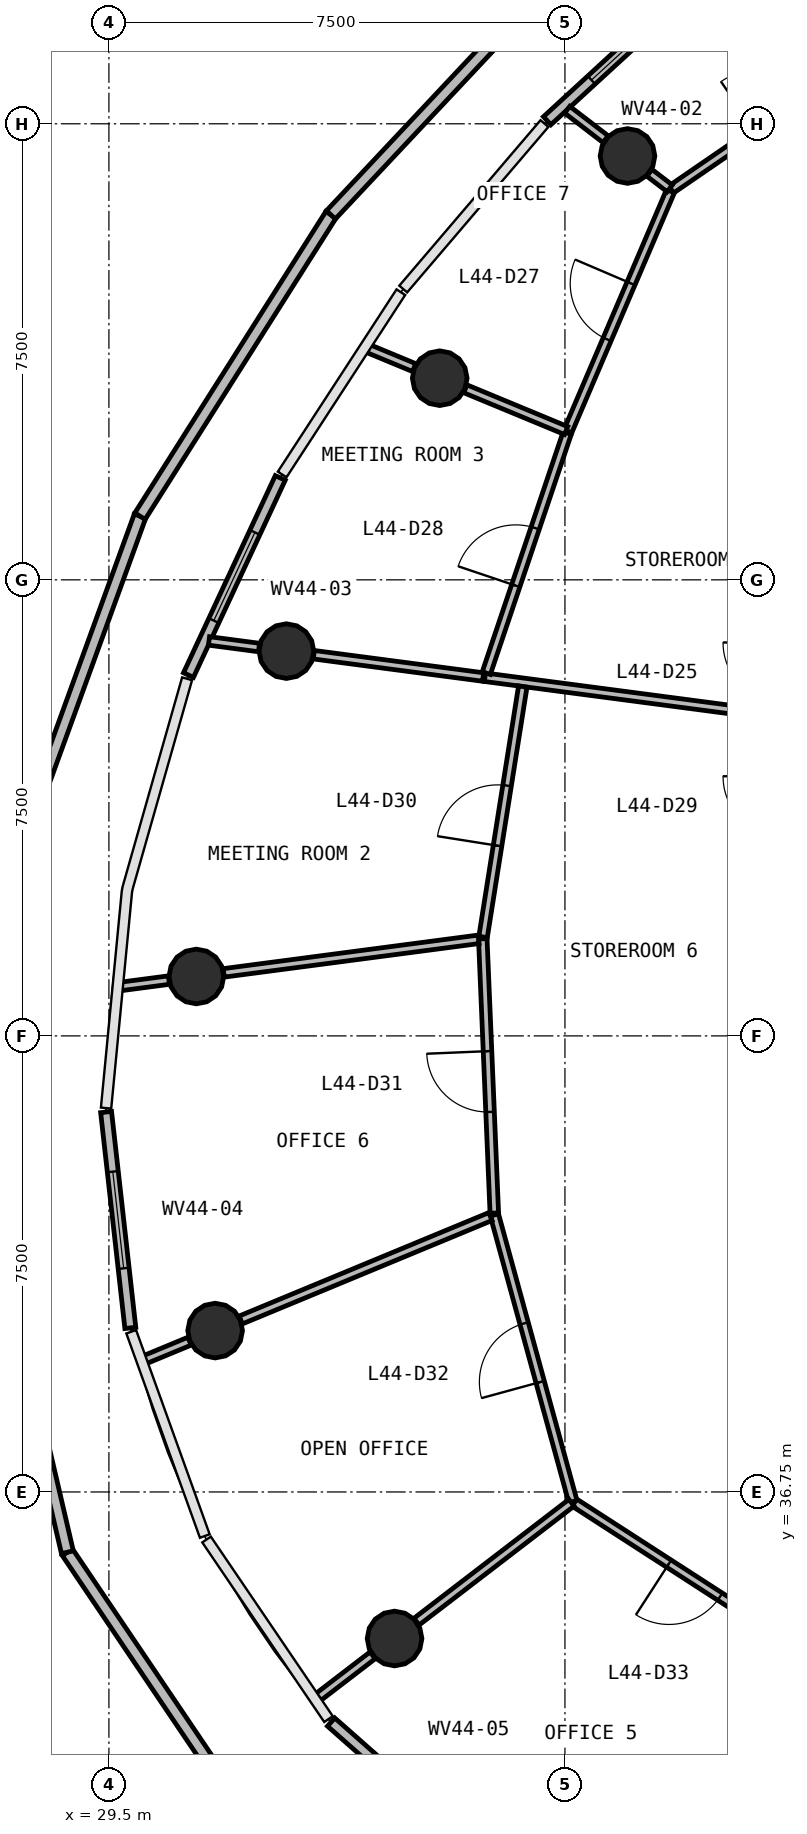
"""IFC4 building model, lengths in metres.
Left out: names, types, materials, properties, quantities, classifications, styles, units other than length and angle.
Written with IfcOpenShell. Run it as: python <this file> out.ifc"""

import sys

from ifc_helpers import new_model, si_unit, direction, frame, frame_2d, origin, origin_2d, place, context, subcontext, project, spatial, rectangle, circle, extrude, source, transform, mapped, element, fill, save


model = new_model("IFC4")
c1 = context("Model", 3, precision=1e-05, world=origin(), true_north=direction((0.0, 1.0)))
c2 = subcontext(c1, "Body", "Model", "MODEL_VIEW")
j1 = project(units=[si_unit("LENGTHUNIT", "METRE"), si_unit("PLANEANGLEUNIT", "RADIAN")], contexts=[c1])
p1 = place(None, origin())
s1 = spatial("IfcSite", under=j1, at=p1, CompositionType="ELEMENT")
p2 = place(p1, origin())
s2 = spatial("IfcBuilding", under=s1, at=p2, CompositionType="ELEMENT")
p3 = place(p2, frame((0.0, 0.0, 183.8)))
s3 = spatial("IfcBuildingStorey", under=s2, at=p3, CompositionType="ELEMENT", Elevation=183.8)
m1 = source(origin(), c2, "Body", "SweptSolid", [
    extrude(circle(Radius=0.45, at=origin_2d()), origin(), (0.0, 0.0, 1.0), 4.22),
])
for number, where, z_axis, x_axis in (
    (1, (38.029, 58.72, -0.32), (0.0, 0.0, 1.0), (1.0, 0.0, 0.0)),
    (2, (34.941, 55.066, -0.32), (0.0, 0.0, 1.0), (1.0, 0.0, 0.0)),
    (3, (32.419, 50.578, -0.32), (0.0, 0.0, 1.0), (1.0, 0.0, 0.0)),
    (4, (30.938, 45.227, -0.32), (0.0, 0.0, 1.0), (1.0, 0.0, 0.0)),
    (5, (31.247, 39.404, -0.32), (0.0, 0.0, 1.0), (1.0, 0.0, 0.0)),
    (6, (34.198, 34.34, -0.32), (0.0, 0.0, 1.0), (1.0, 0.0, 0.0)),
):
    element("IfcColumn", number, at=place(p3, frame(where, z_axis=z_axis, x_axis=x_axis)), inside=s3, PredefinedType="COLUMN", context=c2, shape_type="MappedRepresentation", body=[
        mapped(m1, transform((0.0, 0.0, 0.0), scale=1.0)),
    ])
p4 = place(p3, frame((39.343, 61.72, 0.0), z_axis=(0.0, 0.0, 1.0), x_axis=(-0.736559026804, -0.67637326975, 0.0)))
e7 = element("IfcWall", 7, at=p4, inside=s3, PredefinedType="STANDARD", context=c2, shape_type="SweptSolid", body=[
    extrude(rectangle(XDim=3.578, YDim=0.18, at=frame_2d((1.789, 0.0))), origin(), (0.0, 0.0, 1.0), 3.58),
])
p5 = place(p4, frame((0.989, 0.0, 0.9)))
e8 = element("IfcOpeningElement", 8, at=p5, cuts=e7, PredefinedType="OPENING", context=c2, shape_type="SweptSolid", body=[
    extrude(rectangle(XDim=1.6, YDim=2.0, at=frame_2d((0.8, 1.0))), frame((0.0, 0.1, 0.0), z_axis=(0.0, -1.0, 0.0), x_axis=(1.0, 0.0, 0.0)), (0.0, 0.0, 1.0), 0.2),
])
p6 = place(p3, frame((32.318, 53.426, 0.0), z_axis=(0.0, 0.0, 1.0), x_axis=(-0.422137917225, -0.906531620431, 0.0)))
e9 = element("IfcWall", 9, at=p6, inside=s3, PredefinedType="STANDARD", context=c2, shape_type="SweptSolid", body=[
    extrude(rectangle(XDim=3.576, YDim=0.18, at=frame_2d((1.788, 0.0))), origin(), (0.0, 0.0, 1.0), 3.328),
])
p7 = place(p6, frame((0.988, 0.0, 0.9)))
e10 = element("IfcOpeningElement", 10, at=p7, cuts=e9, PredefinedType="OPENING", context=c2, shape_type="SweptSolid", body=[
    extrude(rectangle(XDim=1.6, YDim=2.0, at=frame_2d((0.8, 1.0))), frame((0.0, 0.1, 0.0), z_axis=(0.0, -1.0, 0.0), x_axis=(1.0, 0.0, 0.0)), (0.0, 0.0, 1.0), 0.2),
])
p8 = place(p3, frame((29.454, 42.998, 0.0), z_axis=(0.0, 0.0, 1.0), x_axis=(0.111594009662, -0.993753881506, 0.0)))
e11 = element("IfcWall", 11, at=p8, inside=s3, PredefinedType="STANDARD", context=c2, shape_type="SweptSolid", body=[
    extrude(rectangle(XDim=3.573, YDim=0.18, at=frame_2d((1.786, 0.0))), origin(), (0.0, 0.0, 1.0), 3.58),
])
p9 = place(p8, frame((0.986, 0.0, 0.9)))
e12 = element("IfcOpeningElement", 12, at=p9, cuts=e11, PredefinedType="OPENING", context=c2, shape_type="SweptSolid", body=[
    extrude(rectangle(XDim=1.6, YDim=2.0, at=frame_2d((0.8, 1.0))), frame((0.0, 0.1, 0.0), z_axis=(0.0, -1.0, 0.0), x_axis=(1.0, 0.0, 0.0)), (0.0, 0.0, 1.0), 0.2),
])
p10 = place(p3, frame((33.154, 32.966, 0.0), z_axis=(0.0, 0.0, 1.0), x_axis=(0.749604367719, -0.661886162339, 0.0)))
e13 = element("IfcWall", 13, at=p10, inside=s3, PredefinedType="STANDARD", context=c2, shape_type="SweptSolid", body=[
    extrude(rectangle(XDim=3.571, YDim=0.18, at=frame_2d((1.785, 0.0))), origin(), (0.0, 0.0, 1.0), 3.58),
])
p11 = place(p10, frame((0.985, 0.0, 0.9)))
e14 = element("IfcOpeningElement", 14, at=p11, cuts=e13, PredefinedType="OPENING", context=c2, shape_type="SweptSolid", body=[
    extrude(rectangle(XDim=1.6, YDim=2.0, at=frame_2d((0.8, 1.0))), frame((0.0, 0.1, 0.0), z_axis=(0.0, -1.0, 0.0), x_axis=(1.0, 0.0, 0.0)), (0.0, 0.0, 1.0), 0.2),
])
p12 = place(p3, frame((32.085, 30.917, 0.0), z_axis=(0.0, 0.0, 1.0), x_axis=(-0.559388155202, 0.828905840141, 0.0)))
e15 = element("IfcWall", 15, at=p12, inside=s3, PredefinedType="PARAPET", context=c2, shape_type="SweptSolid", body=[
    extrude(rectangle(XDim=5.842, YDim=0.2, at=frame_2d((2.921, 0.0))), origin(), (0.0, 0.0, 1.0), 1.1),
])
p13 = place(p3, frame((28.817, 35.759, 0.0), z_axis=(0.0, 0.0, 1.0), x_axis=(-0.22693261975, 0.973910461025, 0.0)))
e16 = element("IfcWall", 16, at=p13, inside=s3, PredefinedType="PARAPET", context=c2, shape_type="SweptSolid", body=[
    extrude(rectangle(XDim=5.847, YDim=0.2, at=frame_2d((2.924, 0.0))), origin(), (0.0, 0.0, 1.0), 1.1),
])
p14 = place(p3, frame((28.009, 47.287, 0.0), z_axis=(0.0, 0.0, 1.0), x_axis=(0.341549130931, 0.939863921619, 0.0)))
e17 = element("IfcWall", 17, at=p14, inside=s3, PredefinedType="PARAPET", context=c2, shape_type="SweptSolid", body=[
    extrude(rectangle(XDim=5.863, YDim=0.2, at=frame_2d((2.931, 0.0))), origin(), (0.0, 0.0, 1.0), 1.1),
])
p15 = place(p3, frame((30.011, 52.797, 0.0), z_axis=(0.0, 0.0, 1.0), x_axis=(0.535248094724, 0.844694901781, 0.0)))
e18 = element("IfcWall", 18, at=p15, inside=s3, PredefinedType="PARAPET", context=c2, shape_type="SweptSolid", body=[
    extrude(rectangle(XDim=5.867, YDim=0.2, at=frame_2d((2.933, 0.0))), origin(), (0.0, 0.0, 1.0), 1.1),
])
p16 = place(p3, frame((33.151, 57.753, 0.0), z_axis=(0.0, 0.0, 1.0), x_axis=(0.684414246662, 0.729093367797, 0.0)))
e19 = element("IfcWall", 19, at=p16, inside=s3, PredefinedType="PARAPET", context=c2, shape_type="SweptSolid", body=[
    extrude(rectangle(XDim=5.869, YDim=0.2, at=frame_2d((2.934, 0.0))), origin(), (0.0, 0.0, 1.0), 1.1),
])
p17 = place(p3, frame((35.684, 50.148, 0.0), z_axis=(0.0, 0.0, 1.0), x_axis=(0.991441658538, -0.130550517866, 0.0)))
e20 = element("IfcWall", 20, at=p17, inside=s3, PredefinedType="PARTITIONING", context=c2, shape_type="SweptSolid", body=[
    extrude(rectangle(XDim=4.868, YDim=0.14, at=frame_2d((2.434, 0.0))), origin(), (0.0, 0.0, 1.0), 2.88),
])
p18 = place(p3, frame((37.131, 36.591, 0.0), z_axis=(0.0, 0.0, 1.0), x_axis=(-0.264211604104, 0.964464736658, 0.0)))
e21 = element("IfcWall", 21, at=p18, inside=s3, PredefinedType="PARTITIONING", context=c2, shape_type="SweptSolid", body=[
    extrude(rectangle(XDim=4.889, YDim=0.14, at=frame_2d((2.445, 0.0))), origin(), (0.0, 0.0, 1.0), 2.88),
])
p19 = place(p18, frame((2.039, 0.0, 0.0)))
e22 = element("IfcOpeningElement", 22, at=p19, cuts=e21, PredefinedType="OPENING", context=c2, shape_type="SweptSolid", body=[
    extrude(rectangle(XDim=1.0, YDim=2.1, at=frame_2d((0.5, 1.05))), frame((0.0, 0.08, 0.0), z_axis=(0.0, -1.0, 0.0), x_axis=(1.0, 0.0, 0.0)), (0.0, 0.0, 1.0), 0.16),
])
p20 = place(p3, frame((41.16, 33.989, 0.0), z_axis=(0.0, 0.0, 1.0), x_axis=(-0.840031596416, 0.542537479832, 0.0)))
e23 = element("IfcWall", 23, at=p20, inside=s3, PredefinedType="PARTITIONING", context=c2, shape_type="SweptSolid", body=[
    extrude(rectangle(XDim=4.766, YDim=0.14, at=frame_2d((2.383, 0.0))), origin(), (0.0, 0.0, 1.0), 2.88),
])
p21 = place(p20, frame((1.917, 0.0, 0.0)))
e24 = element("IfcOpeningElement", 24, at=p21, cuts=e23, PredefinedType="OPENING", context=c2, shape_type="SweptSolid", body=[
    extrude(rectangle(XDim=1.0, YDim=2.1, at=frame_2d((0.5, 1.05))), frame((0.0, 0.08, 0.0), z_axis=(0.0, -1.0, 0.0), x_axis=(1.0, 0.0, 0.0)), (0.0, 0.0, 1.0), 0.16),
])
p22 = place(p3, frame((35.838, 41.336, 0.0), z_axis=(0.0, 0.0, 1.0), x_axis=(-0.042012878169, 0.999117069251, 0.0)))
e25 = element("IfcWall", 25, at=p22, inside=s3, PredefinedType="PARTITIONING", context=c2, shape_type="SweptSolid", body=[
    extrude(rectangle(XDim=4.515, YDim=0.14, at=frame_2d((2.258, 0.0))), origin(), (0.0, 0.0, 1.0), 2.88),
])
p23 = place(p22, frame((1.665, 0.0, 0.0)))
e26 = element("IfcOpeningElement", 26, at=p23, cuts=e25, PredefinedType="OPENING", context=c2, shape_type="SweptSolid", body=[
    extrude(rectangle(XDim=1.0, YDim=2.1, at=frame_2d((0.5, 1.05))), frame((0.0, 0.08, 0.0), z_axis=(0.0, -1.0, 0.0), x_axis=(1.0, 0.0, 0.0)), (0.0, 0.0, 1.0), 0.16),
])
p24 = place(p3, frame((35.774, 41.279, 0.0), z_axis=(0.0, 0.0, 1.0), x_axis=(-0.923885643911, -0.382668677808, 0.0)))
e27 = element("IfcWall", 27, at=p24, inside=s3, PredefinedType="PARTITIONING", context=c2, shape_type="SweptSolid", body=[
    extrude(rectangle(XDim=4.446, YDim=0.14, at=frame_2d((2.223, 0.0))), origin(), (0.0, 0.0, 1.0), 2.88),
])
p25 = place(p3, frame((38.747, 58.169, 0.0), z_axis=(0.0, 0.0, 1.0), x_axis=(0.824531922814, 0.565815436569, 0.0)))
e28 = element("IfcWall", 28, at=p25, inside=s3, PredefinedType="PARTITIONING", context=c2, shape_type="SweptSolid", body=[
    extrude(rectangle(XDim=4.33, YDim=0.14, at=frame_2d((2.165, 0.0))), origin(), (0.0, 0.0, 1.0), 2.88),
])
p26 = place(p25, frame((1.68, 0.0, 0.0)))
e29 = element("IfcOpeningElement", 29, at=p26, cuts=e28, PredefinedType="OPENING", context=c2, shape_type="SweptSolid", body=[
    extrude(rectangle(XDim=1.0, YDim=2.1, at=frame_2d((0.5, 1.05))), frame((0.0, 0.08, 0.0), z_axis=(0.0, -1.0, 0.0), x_axis=(1.0, 0.0, 0.0)), (0.0, 0.0, 1.0), 0.16),
])
p27 = place(p3, frame((37.047, 54.194, 0.0), z_axis=(0.0, 0.0, 1.0), x_axis=(0.393178046525, 0.919462355799, 0.0)))
e30 = element("IfcWall", 30, at=p27, inside=s3, PredefinedType="PARTITIONING", context=c2, shape_type="SweptSolid", body=[
    extrude(rectangle(XDim=4.294, YDim=0.14, at=frame_2d((2.147, 0.0))), origin(), (0.0, 0.0, 1.0), 2.88),
])
p28 = place(p27, frame((1.644, 0.0, 0.0)))
e31 = element("IfcOpeningElement", 31, at=p28, cuts=e30, PredefinedType="OPENING", context=c2, shape_type="SweptSolid", body=[
    extrude(rectangle(XDim=1.0, YDim=2.1, at=frame_2d((0.5, 1.05))), frame((0.0, 0.08, 0.0), z_axis=(0.0, -1.0, 0.0), x_axis=(1.0, 0.0, 0.0)), (0.0, 0.0, 1.0), 0.16),
])
p29 = place(p3, frame((35.579, 45.838, 0.0), z_axis=(0.0, 0.0, 1.0), x_axis=(-0.991444463544, -0.130529214005, 0.0)))
e32 = element("IfcWall", 32, at=p29, inside=s3, PredefinedType="PARTITIONING", context=c2, shape_type="SweptSolid", body=[
    extrude(rectangle(XDim=4.227, YDim=0.14, at=frame_2d((2.114, 0.0))), origin(), (0.0, 0.0, 1.0), 2.88),
])
p30 = place(p3, frame((35.653, 45.877, 0.0), z_axis=(0.0, 0.0, 1.0), x_axis=(0.15660891281, 0.98766069499, 0.0)))
e33 = element("IfcWall", 33, at=p30, inside=s3, PredefinedType="PARTITIONING", context=c2, shape_type="SweptSolid", body=[
    extrude(rectangle(XDim=4.17, YDim=0.14, at=frame_2d((2.085, 0.0))), origin(), (0.0, 0.0, 1.0), 2.88),
])
p31 = place(p30, frame((1.52, 0.0, 0.0)))
e34 = element("IfcOpeningElement", 34, at=p31, cuts=e33, PredefinedType="OPENING", context=c2, shape_type="SweptSolid", body=[
    extrude(rectangle(XDim=1.0, YDim=2.1, at=frame_2d((0.5, 1.05))), frame((0.0, 0.08, 0.0), z_axis=(0.0, -1.0, 0.0), x_axis=(1.0, 0.0, 0.0)), (0.0, 0.0, 1.0), 0.16),
])
p32 = place(p3, frame((35.707, 50.216, 0.0), z_axis=(0.0, 0.0, 1.0), x_axis=(0.319319104698, 0.947647249442, 0.0)))
e35 = element("IfcWall", 35, at=p32, inside=s3, PredefinedType="PARTITIONING", context=c2, shape_type="SweptSolid", body=[
    extrude(rectangle(XDim=4.168, YDim=0.14, at=frame_2d((2.084, 0.0))), origin(), (0.0, 0.0, 1.0), 2.88),
])
p33 = place(p32, frame((1.518, 0.0, 0.0)))
e36 = element("IfcOpeningElement", 36, at=p33, cuts=e35, PredefinedType="OPENING", context=c2, shape_type="SweptSolid", body=[
    extrude(rectangle(XDim=1.0, YDim=2.1, at=frame_2d((0.5, 1.05))), frame((0.0, 0.08, 0.0), z_axis=(0.0, -1.0, 0.0), x_axis=(1.0, 0.0, 0.0)), (0.0, 0.0, 1.0), 0.16),
])
p34 = place(p3, frame((32.87, 50.519, 0.0), z_axis=(0.0, 0.0, 1.0), x_axis=(0.991450448598, -0.130483746019, 0.0)))
e37 = element("IfcWall", 37, at=p34, inside=s3, PredefinedType="PARTITIONING", context=c2, shape_type="SweptSolid", body=[
    extrude(rectangle(XDim=2.808, YDim=0.14, at=frame_2d((1.404, 0.0))), origin(), (0.0, 0.0, 1.0), 2.88),
])
p35 = place(p3, frame((37.107, 36.573, 0.0), z_axis=(0.0, 0.0, 1.0), x_axis=(-0.79334944096, -0.608766510683, 0.0)))
e38 = element("IfcWall", 38, at=p35, inside=s3, PredefinedType="PARTITIONING", context=c2, shape_type="SweptSolid", body=[
    extrude(rectangle(XDim=3.213, YDim=0.14, at=frame_2d((1.606, 0.0))), origin(), (0.0, 0.0, 1.0), 2.88),
])
p36 = place(p3, frame((40.787, 33.387, 0.0), z_axis=(0.0, 0.0, 1.0), x_axis=(-0.608778925589, -0.793339914386, 0.0)))
e39 = element("IfcWall", 39, at=p36, inside=s3, PredefinedType="PARTITIONING", context=c2, shape_type="SweptSolid", body=[
    extrude(rectangle(XDim=2.331, YDim=0.14, at=frame_2d((1.166, 0.0))), origin(), (0.0, 0.0, 1.0), 2.88),
])
p37 = place(p3, frame((37.02, 54.205, 0.0), z_axis=(0.0, 0.0, 1.0), x_axis=(-0.923867642226, 0.382712136791, 0.0)))
e40 = element("IfcWall", 40, at=p37, inside=s3, PredefinedType="PARTITIONING", context=c2, shape_type="SweptSolid", body=[
    extrude(rectangle(XDim=1.795, YDim=0.14, at=frame_2d((0.897, 0.0))), origin(), (0.0, 0.0, 1.0), 2.88),
])
p38 = place(p3, frame((33.837, 34.063, 0.0), z_axis=(0.0, 0.0, 1.0), x_axis=(-0.793460027174, -0.608622366725, 0.0)))
e41 = element("IfcWall", 41, at=p38, inside=s3, PredefinedType="PARTITIONING", context=c2, shape_type="SweptSolid", body=[
    extrude(rectangle(XDim=1.128, YDim=0.14, at=frame_2d((0.564, 0.0))), origin(), (0.0, 0.0, 1.0), 2.88),
])
p39 = place(p3, frame((31.969, 50.637, 0.0), z_axis=(0.0, 0.0, 1.0), x_axis=(-0.991427230184, 0.130660044583, 0.0)))
e42 = element("IfcWall", 42, at=p39, inside=s3, PredefinedType="PARTITIONING", context=c2, shape_type="SweptSolid", body=[
    extrude(rectangle(XDim=0.83, YDim=0.14, at=frame_2d((0.415, 0.0))), origin(), (0.0, 0.0, 1.0), 2.88),
])
p40 = place(p3, frame((30.487, 45.168, 0.0), z_axis=(0.0, 0.0, 1.0), x_axis=(-0.991441191387, -0.130554065513, 0.0)))
e43 = element("IfcWall", 43, at=p40, inside=s3, PredefinedType="PARTITIONING", context=c2, shape_type="SweptSolid", body=[
    extrude(rectangle(XDim=0.825, YDim=0.14, at=frame_2d((0.412, 0.0))), origin(), (0.0, 0.0, 1.0), 2.88),
])
p41 = place(p3, frame((34.52, 55.24, 0.0), z_axis=(0.0, 0.0, 1.0), x_axis=(-0.92398761999, 0.382422381806, 0.0)))
e44 = element("IfcWall", 44, at=p41, inside=s3, PredefinedType="PARTITIONING", context=c2, shape_type="SweptSolid", body=[
    extrude(rectangle(XDim=0.815, YDim=0.14, at=frame_2d((0.407, 0.0))), origin(), (0.0, 0.0, 1.0), 2.88),
])
for number, where, z_axis, x_axis in (
    (45, (30.826, 39.23, 0.0), (0.0, 0.0, 1.0), (-0.924, -0.383, 0.0)),
    (46, (37.668, 58.997, 0.0), (0.0, 0.0, 1.0), (-0.793, 0.609, 0.0)),
):
    element("IfcWall", number, at=place(p3, frame(where, z_axis=z_axis, x_axis=x_axis)), inside=s3, PredefinedType="PARTITIONING", context=c2, shape_type="SweptSolid", body=[
        extrude(rectangle(XDim=0.796, YDim=0.14, at=frame_2d((0.398, 0.0))), origin(), (0.0, 0.0, 1.0), 2.88),
    ])
p42 = place(p3, frame((38.723, 58.188, 0.0), z_axis=(0.0, 0.0, 1.0), x_axis=(-0.793335399531, 0.60878480915, 0.0)))
e47 = element("IfcWall", 47, at=p42, inside=s3, PredefinedType="PARTITIONING", context=c2, shape_type="SweptSolid", body=[
    extrude(rectangle(XDim=0.421, YDim=0.14, at=frame_2d((0.21, 0.0))), origin(), (0.0, 0.0, 1.0), 2.88),
])
m2 = source(origin(), c2, "Body", "SweptSolid", [
    extrude(rectangle(XDim=1.6, YDim=2.0, at=frame_2d((0.8, 1.0))), frame((0.0, 0.03, 0.0), z_axis=(0.0, -1.0, 0.0), x_axis=(1.0, 0.0, 0.0)), (0.0, 0.0, 1.0), 0.06),
])
p43 = place(p5, origin())
e48 = element("IfcWindow", 48, at=p43, inside=s3, PartitioningType="SINGLE_PANEL", PredefinedType="WINDOW", context=c2, shape_type="MappedRepresentation", body=[
    mapped(m2, transform((0.0, 0.0, 0.0), scale=1.0)),
])
fill(e8, e48)
p44 = place(p7, origin())
e49 = element("IfcWindow", 49, at=p44, inside=s3, PartitioningType="SINGLE_PANEL", PredefinedType="WINDOW", context=c2, shape_type="MappedRepresentation", body=[
    mapped(m2, transform((0.0, 0.0, 0.0), scale=1.0)),
])
fill(e10, e49)
p45 = place(p9, origin())
e50 = element("IfcWindow", 50, at=p45, inside=s3, PartitioningType="SINGLE_PANEL", PredefinedType="WINDOW", context=c2, shape_type="MappedRepresentation", body=[
    mapped(m2, transform((0.0, 0.0, 0.0), scale=1.0)),
])
fill(e12, e50)
m3 = source(origin(), c2, "Body", "SweptSolid", [
    extrude(rectangle(XDim=1.0, YDim=2.1, at=frame_2d((0.5, 1.05))), frame((0.0, 0.025, 0.0), z_axis=(0.0, -1.0, 0.0), x_axis=(1.0, 0.0, 0.0)), (0.0, 0.0, 1.0), 0.05),
])
p46 = place(p28, origin())
e51 = element("IfcDoor", 51, at=p46, inside=s3, OperationType="SINGLE_SWING_RIGHT", PredefinedType="DOOR", context=c2, shape_type="MappedRepresentation", body=[
    mapped(m3, transform((0.0, 0.0, 0.0), scale=1.0)),
])
fill(e31, e51)
p47 = place(p33, origin())
e52 = element("IfcDoor", 52, at=p47, inside=s3, OperationType="SINGLE_SWING_LEFT", PredefinedType="DOOR", context=c2, shape_type="MappedRepresentation", body=[
    mapped(m3, transform((0.0, 0.0, 0.0), scale=1.0)),
])
fill(e36, e52)
p48 = place(p31, origin())
e53 = element("IfcDoor", 53, at=p48, inside=s3, OperationType="SINGLE_SWING_LEFT", PredefinedType="DOOR", context=c2, shape_type="MappedRepresentation", body=[
    mapped(m3, transform((0.0, 0.0, 0.0), scale=1.0)),
])
fill(e34, e53)
p49 = place(p23, origin())
e54 = element("IfcDoor", 54, at=p49, inside=s3, OperationType="SINGLE_SWING_RIGHT", PredefinedType="DOOR", context=c2, shape_type="MappedRepresentation", body=[
    mapped(m3, transform((0.0, 0.0, 0.0), scale=1.0)),
])
fill(e26, e54)
p50 = place(p19, origin())
e55 = element("IfcDoor", 55, at=p50, inside=s3, OperationType="SINGLE_SWING_LEFT", PredefinedType="DOOR", context=c2, shape_type="MappedRepresentation", body=[
    mapped(m3, transform((0.0, 0.0, 0.0), scale=1.0)),
])
fill(e22, e55)
p51 = place(p21, origin())
e56 = element("IfcDoor", 56, at=p51, inside=s3, OperationType="SINGLE_SWING_RIGHT", PredefinedType="DOOR", context=c2, shape_type="MappedRepresentation", body=[
    mapped(m3, transform((0.0, 0.0, 0.0), scale=1.0)),
])
fill(e24, e56)
save(model, sys.argv[1])
